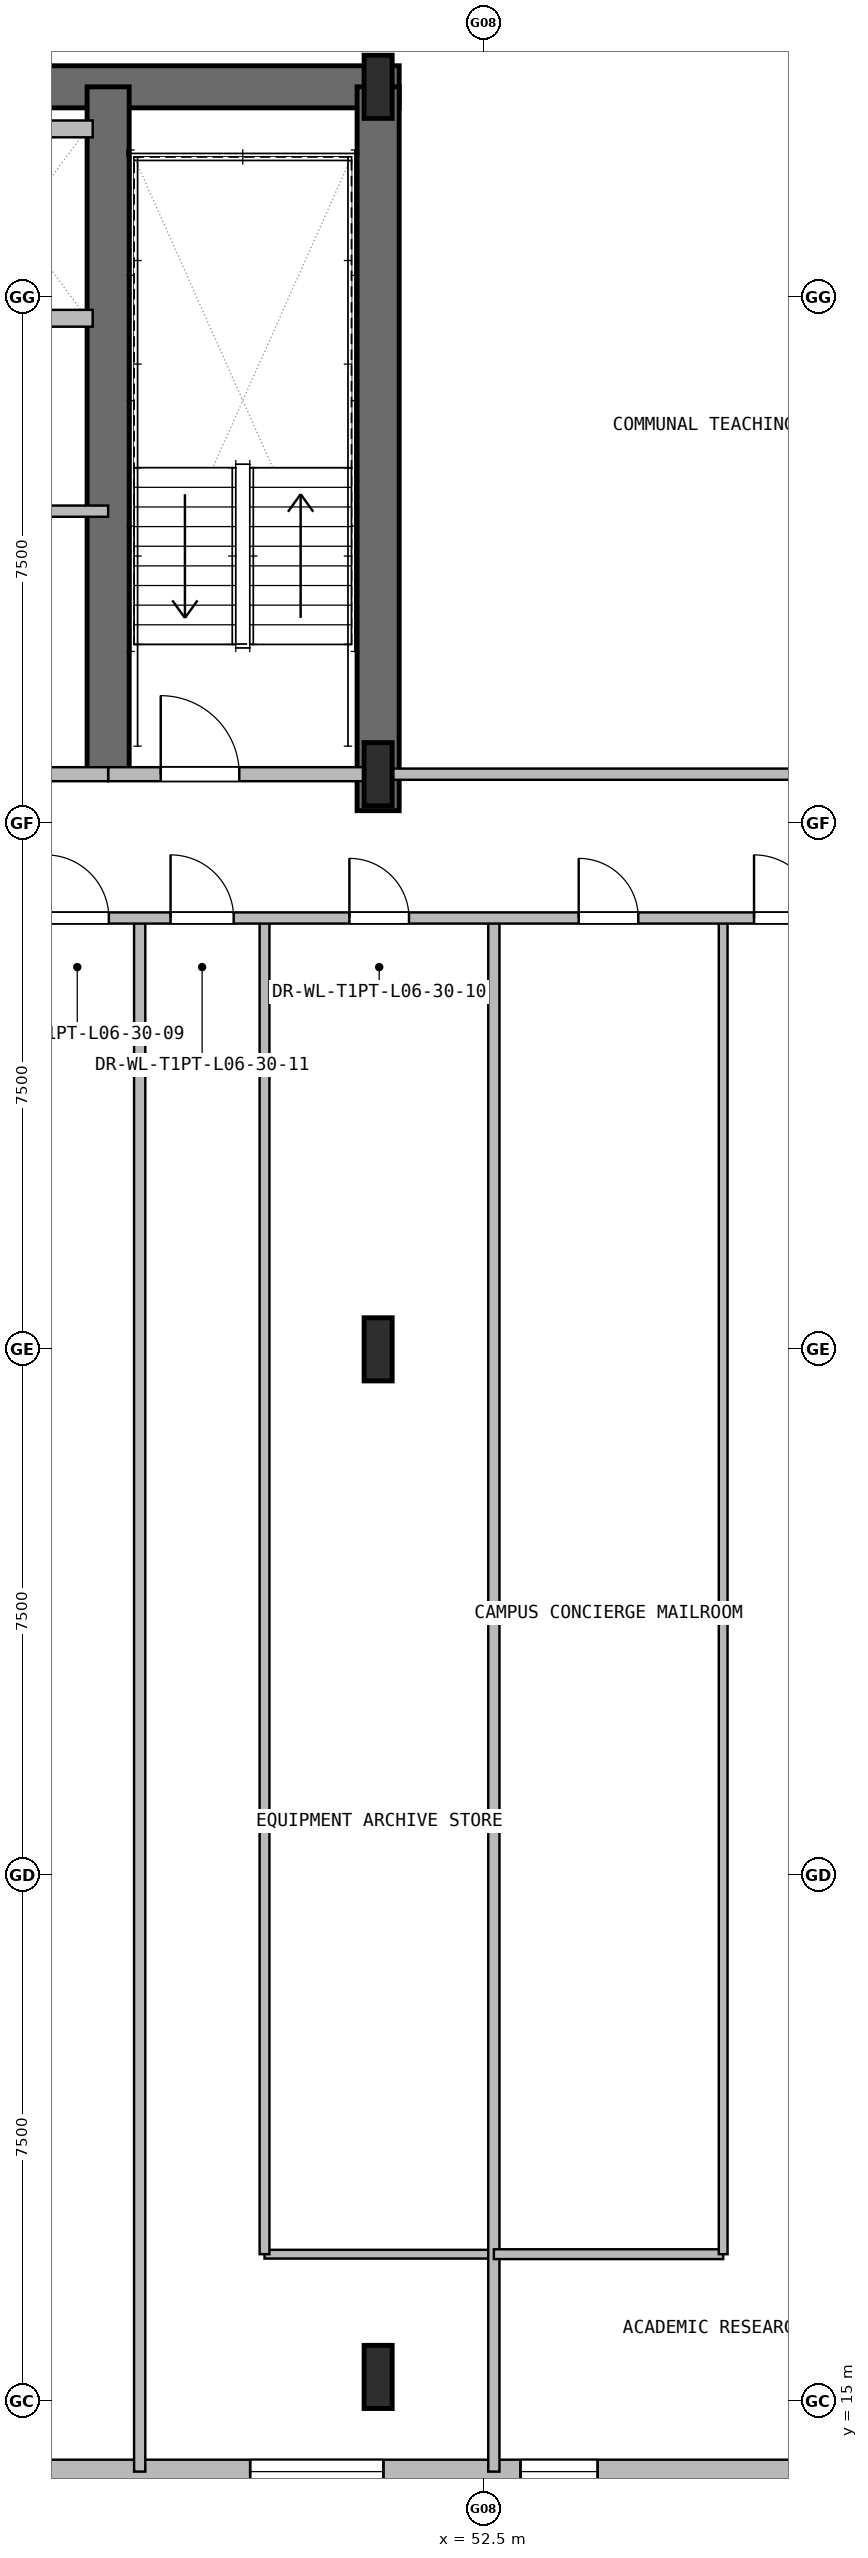
"""IFC4 building model, lengths in metres.
Left out: names, types, materials, properties, quantities, classifications, styles, units other than length and angle.
Written with IfcOpenShell. Run it as: python <this file> out.ifc"""

import sys

from ifc_helpers import new_model, si_unit, direction, frame, frame_2d, origin, origin_2d, place, context, subcontext, project, spatial, rectangle, i_section, extrude, element, fill, save


model = new_model("IFC4")
c1 = context("Model", 3, precision=1e-05, world=origin(), true_north=direction((0.0, 1.0)))
c2 = subcontext(c1, "Body", "Model", "MODEL_VIEW")
j1 = project(units=[si_unit("LENGTHUNIT", "METRE"), si_unit("PLANEANGLEUNIT", "RADIAN")], contexts=[c1])
p1 = place(None, origin())
s1 = spatial("IfcSite", under=j1, at=p1, CompositionType="ELEMENT")
p2 = place(p1, origin())
s2 = spatial("IfcBuilding", under=s1, at=p2, CompositionType="ELEMENT")
p3 = place(p2, frame((0.0, 0.0, 30.6)))
s3 = spatial("IfcBuildingStorey", under=s2, at=p3, CompositionType="ELEMENT", Elevation=30.6)
p4 = place(p3, frame((23.7, 48.0, 0.0), z_axis=(0.0, 0.0, 1.0), x_axis=(1.0, 0.0, 0.0)))
e1 = element("IfcWall", 1, at=p4, inside=s3, PredefinedType="SHEAR", context=c2, shape_type="SweptSolid", body=[
    extrude(rectangle(XDim=27.6, YDim=0.6, at=frame_2d((13.8, 0.0))), origin(), (0.0, 0.0, 1.0), 3.3),
])
p5 = place(p3, frame((51.0, 37.68, 0.0), z_axis=(0.0, 0.0, 1.0), x_axis=(0.0, 1.0, 0.0)))
e2 = element("IfcWall", 2, at=p5, inside=s3, PredefinedType="SHEAR", context=c2, shape_type="SweptSolid", body=[
    extrude(rectangle(XDim=10.32, YDim=0.6, at=frame_2d((5.16, 0.0))), origin(), (0.0, 0.0, 1.0), 3.3),
])
p6 = place(p3, frame((47.15, 38.2, 0.0), z_axis=(0.0, 0.0, 1.0), x_axis=(0.0, 1.0, 0.0)))
e3 = element("IfcWall", 3, at=p6, inside=s3, PredefinedType="SHEAR", context=c2, shape_type="SweptSolid", body=[
    extrude(rectangle(XDim=9.8, YDim=0.6, at=frame_2d((4.9, 0.0))), origin(), (0.0, 0.0, 1.0), 3.3),
])
for number, where, z_axis, x_axis in (
    (4, (51.0, 15.35, 0.0), (0.0, 0.0, 1.0), (1.0, 0.0, 0.0)),
    (5, (51.0, 30.0, 0.0), (0.0, 0.0, 1.0), (1.0, 0.0, 0.0)),
    (6, (51.0, 38.2, 0.0), (0.0, 0.0, 1.0), (1.0, 0.0, 0.0)),
    (7, (51.0, 48.0, 0.0), (0.0, 0.0, 1.0), (1.0, 0.0, 0.0)),
):
    element("IfcColumn", number, at=place(p3, frame(where, z_axis=z_axis, x_axis=x_axis)), inside=s3, PredefinedType="COLUMN", context=c2, shape_type="SweptSolid", body=[
        extrude(i_section(OverallWidth=0.4, OverallDepth=0.9, WebThickness=0.02, FlangeThickness=0.036, at=origin_2d()), origin(), (0.0, 0.0, 1.0), 3.3),
    ])
p7 = place(p3, frame((62.2, 14.0, 0.0), z_axis=(0.0, 0.0, 1.0), x_axis=(-1.0, 0.0, 0.0)))
e8 = element("IfcWall", 8, at=p7, inside=s3, PredefinedType="SOLIDWALL", context=c2, shape_type="SweptSolid", body=[
    extrude(rectangle(XDim=49.4, YDim=0.34, at=frame_2d((24.7, 0.0))), origin(), (0.0, 0.0, 1.0), 3.03),
])
p8 = place(p7, frame((35.197, 0.0, 0.0)))
e9 = element("IfcOpeningElement", 9, at=p8, cuts=e8, PredefinedType="OPENING", context=c2, shape_type="SweptSolid", body=[
    extrude(rectangle(XDim=1.05, YDim=2.1, at=frame_2d((0.525, 1.05))), frame((0.0, 0.18, 0.0), z_axis=(0.0, -1.0, 0.0), x_axis=(1.0, 0.0, 0.0)), (0.0, 0.0, 1.0), 0.36),
])
p9 = place(p7, frame((40.23, 0.0, 0.8)))
e10 = element("IfcOpeningElement", 10, at=p9, cuts=e8, PredefinedType="OPENING", context=c2, shape_type="SweptSolid", body=[
    extrude(rectangle(XDim=1.1, YDim=1.5, at=frame_2d((0.55, 0.75))), frame((0.0, 0.18, 0.0), z_axis=(0.0, -1.0, 0.0), x_axis=(1.0, 0.0, 0.0)), (0.0, 0.0, 1.0), 0.36),
])
p10 = place(p7, frame((36.614, 0.0, 0.8)))
e11 = element("IfcOpeningElement", 11, at=p10, cuts=e8, PredefinedType="OPENING", context=c2, shape_type="SweptSolid", body=[
    extrude(rectangle(XDim=1.9, YDim=1.85, at=frame_2d((0.95, 0.925))), frame((0.0, 0.18, 0.0), z_axis=(0.0, -1.0, 0.0), x_axis=(1.0, 0.0, 0.0)), (0.0, 0.0, 1.0), 0.36),
])
p11 = place(p7, frame((26.275, 0.0, 0.8)))
e12 = element("IfcOpeningElement", 12, at=p11, cuts=e8, PredefinedType="OPENING", context=c2, shape_type="SweptSolid", body=[
    extrude(rectangle(XDim=1.9, YDim=1.85, at=frame_2d((0.95, 0.925))), frame((0.0, 0.18, 0.0), z_axis=(0.0, -1.0, 0.0), x_axis=(1.0, 0.0, 0.0)), (0.0, 0.0, 1.0), 0.36),
])
p12 = place(p7, frame((16.175, 0.0, 0.8)))
e13 = element("IfcOpeningElement", 13, at=p12, cuts=e8, PredefinedType="OPENING", context=c2, shape_type="SweptSolid", body=[
    extrude(rectangle(XDim=1.9, YDim=1.85, at=frame_2d((0.95, 0.925))), frame((0.0, 0.18, 0.0), z_axis=(0.0, -1.0, 0.0), x_axis=(1.0, 0.0, 0.0)), (0.0, 0.0, 1.0), 0.36),
])
p13 = place(p7, frame((11.125, 0.0, 0.8)))
e14 = element("IfcOpeningElement", 14, at=p13, cuts=e8, PredefinedType="OPENING", context=c2, shape_type="SweptSolid", body=[
    extrude(rectangle(XDim=1.9, YDim=1.85, at=frame_2d((0.95, 0.925))), frame((0.0, 0.18, 0.0), z_axis=(0.0, -1.0, 0.0), x_axis=(1.0, 0.0, 0.0)), (0.0, 0.0, 1.0), 0.36),
])
p14 = place(p7, frame((8.07, 0.0, 0.8)))
e15 = element("IfcOpeningElement", 15, at=p14, cuts=e8, PredefinedType="OPENING", context=c2, shape_type="SweptSolid", body=[
    extrude(rectangle(XDim=1.1, YDim=1.5, at=frame_2d((0.55, 0.75))), frame((0.0, 0.18, 0.0), z_axis=(0.0, -1.0, 0.0), x_axis=(1.0, 0.0, 0.0)), (0.0, 0.0, 1.0), 0.36),
])
p15 = place(p3, frame((47.15, 38.2, 0.0), z_axis=(0.0, 0.0, 1.0), x_axis=(1.0, 0.0, 0.0)))
e16 = element("IfcWall", 16, at=p15, inside=s3, PredefinedType="PARTITIONING", context=c2, shape_type="SweptSolid", body=[
    extrude(rectangle(XDim=3.85, YDim=0.2, at=frame_2d((1.925, 0.0))), origin(), (0.0, 0.0, 1.0), 2.33),
])
p16 = place(p15, frame((0.75, 0.0, 0.0)))
e17 = element("IfcOpeningElement", 17, at=p16, cuts=e16, PredefinedType="OPENING", context=c2, shape_type="SweptSolid", body=[
    extrude(rectangle(XDim=1.12, YDim=2.1, at=frame_2d((0.56, 1.05))), frame((0.0, 0.11, 0.0), z_axis=(0.0, -1.0, 0.0), x_axis=(1.0, 0.0, 0.0)), (0.0, 0.0, 1.0), 0.22),
])
p17 = place(p3, frame((30.8, 38.2, 0.0), z_axis=(0.0, 0.0, 1.0), x_axis=(1.0, 0.0, 0.0)))
e18 = element("IfcWall", 18, at=p17, inside=s3, PredefinedType="PARTITIONING", context=c2, shape_type="SweptSolid", body=[
    extrude(rectangle(XDim=16.35, YDim=0.2, at=frame_2d((8.175, 0.0))), origin(), (0.0, 0.0, 1.0), 2.33),
])
p18 = place(p17, frame((2.95, 0.0, 0.0)))
e19 = element("IfcOpeningElement", 19, at=p18, cuts=e18, PredefinedType="OPENING", context=c2, shape_type="SweptSolid", body=[
    extrude(rectangle(XDim=1.12, YDim=2.1, at=frame_2d((0.56, 1.05))), frame((0.0, 0.11, 0.0), z_axis=(0.0, -1.0, 0.0), x_axis=(1.0, 0.0, 0.0)), (0.0, 0.0, 1.0), 0.22),
])
p19 = place(p17, frame((8.75, 0.0, 0.0)))
e20 = element("IfcOpeningElement", 20, at=p19, cuts=e18, PredefinedType="OPENING", context=c2, shape_type="SweptSolid", body=[
    extrude(rectangle(XDim=1.12, YDim=2.1, at=frame_2d((0.56, 1.05))), frame((0.0, 0.11, 0.0), z_axis=(0.0, -1.0, 0.0), x_axis=(1.0, 0.0, 0.0)), (0.0, 0.0, 1.0), 0.22),
])
for number, where, z_axis, x_axis in (
    (21, (44.77, 44.7, 0.0), (0.0, 0.0, 1.0), (1.0, 0.0, 0.0)),
    (22, (44.77, 47.4, 0.0), (0.0, 0.0, 1.0), (1.0, 0.0, 0.0)),
):
    element("IfcWall", number, at=place(p3, frame(where, z_axis=z_axis, x_axis=x_axis)), inside=s3, PredefinedType="PARTITIONING", context=c2, shape_type="SweptSolid", body=[
        extrude(rectangle(XDim=2.16, YDim=0.24, at=frame_2d((1.08, 0.0))), origin(), (0.0, 0.0, 1.0), 3.03),
    ])
p20 = place(p3, frame((42.5, 41.95, 0.0), z_axis=(0.0, 0.0, 1.0), x_axis=(1.0, 0.0, 0.0)))
e23 = element("IfcWall", 23, at=p20, inside=s3, PredefinedType="PARTITIONING", context=c2, shape_type="SweptSolid", body=[
    extrude(rectangle(XDim=4.65, YDim=0.16, at=frame_2d((2.325, 0.0))), origin(), (0.0, 0.0, 1.0), 3.03),
])
p21 = place(p20, frame((0.66, 0.0, 0.0)))
e24 = element("IfcOpeningElement", 24, at=p21, cuts=e23, PredefinedType="OPENING", context=c2, shape_type="SweptSolid", body=[
    extrude(rectangle(XDim=0.85, YDim=2.05, at=frame_2d((0.425, 1.025))), frame((0.0, 0.09, 0.0), z_axis=(0.0, -1.0, 0.0), x_axis=(1.0, 0.0, 0.0)), (0.0, 0.0, 1.0), 0.18),
])
p22 = place(p20, frame((2.73, 0.0, 0.0)))
e25 = element("IfcOpeningElement", 25, at=p22, cuts=e23, PredefinedType="OPENING", context=c2, shape_type="SweptSolid", body=[
    extrude(rectangle(XDim=0.85, YDim=2.05, at=frame_2d((0.425, 1.025))), frame((0.0, 0.09, 0.0), z_axis=(0.0, -1.0, 0.0), x_axis=(1.0, 0.0, 0.0)), (0.0, 0.0, 1.0), 0.18),
])
p23 = place(p3, frame((51.0, 38.2, 0.0), z_axis=(0.0, 0.0, 1.0), x_axis=(1.0, 0.0, 0.0)))
e26 = element("IfcWall", 26, at=p23, inside=s3, PredefinedType="PARTITIONING", context=c2, shape_type="SweptSolid", body=[
    extrude(rectangle(XDim=8.85, YDim=0.16, at=frame_2d((4.425, 0.0))), origin(), (0.0, 0.0, 1.0), 2.33),
])
p24 = place(p3, frame((47.6, 14.0, 0.0), z_axis=(0.0, 0.0, 1.0), x_axis=(0.0, 1.0, 0.0)))
e27 = element("IfcWall", 27, at=p24, inside=s3, PredefinedType="PARTITIONING", context=c2, shape_type="SweptSolid", body=[
    extrude(rectangle(XDim=22.15, YDim=0.16, at=frame_2d((11.075, 0.0))), origin(), (0.0, 0.0, 1.0), 3.03),
])
p25 = place(p3, frame((49.38, 17.1, 0.0), z_axis=(0.0, 0.0, 1.0), x_axis=(1.0, 0.0, 0.0)))
e28 = element("IfcWall", 28, at=p25, inside=s3, PredefinedType="PARTITIONING", context=c2, shape_type="SweptSolid", body=[
    extrude(rectangle(XDim=3.27, YDim=0.125, at=frame_2d((1.635, 0.0))), origin(), (0.0, 0.0, 1.0), 3.03),
])
p26 = place(p3, frame((49.38, 17.1, 0.0), z_axis=(0.0, 0.0, 1.0), x_axis=(0.0, 1.0, 0.0)))
e29 = element("IfcWall", 29, at=p26, inside=s3, PredefinedType="PARTITIONING", context=c2, shape_type="SweptSolid", body=[
    extrude(rectangle(XDim=19.05, YDim=0.14, at=frame_2d((9.525, 0.0))), origin(), (0.0, 0.0, 1.0), 3.03),
])
p27 = place(p3, frame((52.65, 14.0, 0.0), z_axis=(0.0, 0.0, 1.0), x_axis=(0.0, 1.0, 0.0)))
e30 = element("IfcWall", 30, at=p27, inside=s3, PredefinedType="PARTITIONING", context=c2, shape_type="SweptSolid", body=[
    extrude(rectangle(XDim=22.15, YDim=0.16, at=frame_2d((11.075, 0.0))), origin(), (0.0, 0.0, 1.0), 3.03),
])
p28 = place(p3, frame((52.65, 17.1, 0.0), z_axis=(0.0, 0.0, 1.0), x_axis=(1.0, 0.0, 0.0)))
e31 = element("IfcWall", 31, at=p28, inside=s3, PredefinedType="PARTITIONING", context=c2, shape_type="SweptSolid", body=[
    extrude(rectangle(XDim=3.27, YDim=0.14, at=frame_2d((1.635, 0.0))), origin(), (0.0, 0.0, 1.0), 3.03),
])
p29 = place(p3, frame((55.92, 17.1, 0.0), z_axis=(0.0, 0.0, 1.0), x_axis=(0.0, 1.0, 0.0)))
e32 = element("IfcWall", 32, at=p29, inside=s3, PredefinedType="PARTITIONING", context=c2, shape_type="SweptSolid", body=[
    extrude(rectangle(XDim=19.05, YDim=0.125, at=frame_2d((9.525, 0.0))), origin(), (0.0, 0.0, 1.0), 3.03),
])
p30 = place(p3, frame((17.3, 36.15, 0.0), z_axis=(0.0, 0.0, 1.0), x_axis=(1.0, 0.0, 0.0)))
e33 = element("IfcWall", 33, at=p30, inside=s3, PredefinedType="PARTITIONING", context=c2, shape_type="SweptSolid", body=[
    extrude(rectangle(XDim=40.4, YDim=0.16, at=frame_2d((20.2, 0.0))), origin(), (0.0, 0.0, 1.0), 3.03),
])
p31 = place(p30, frame((2.99, 0.0, 0.0)))
e34 = element("IfcOpeningElement", 34, at=p31, cuts=e33, PredefinedType="OPENING", context=c2, shape_type="SweptSolid", body=[
    extrude(rectangle(XDim=0.85, YDim=2.05, at=frame_2d((0.425, 1.025))), frame((0.0, 0.09, 0.0), z_axis=(0.0, -1.0, 0.0), x_axis=(1.0, 0.0, 0.0)), (0.0, 0.0, 1.0), 0.18),
])
p32 = place(p30, frame((0.44, 0.0, 0.0)))
e35 = element("IfcOpeningElement", 35, at=p32, cuts=e33, PredefinedType="OPENING", context=c2, shape_type="SweptSolid", body=[
    extrude(rectangle(XDim=0.9, YDim=2.05, at=frame_2d((0.45, 1.025))), frame((0.0, 0.09, 0.0), z_axis=(0.0, -1.0, 0.0), x_axis=(1.0, 0.0, 0.0)), (0.0, 0.0, 1.0), 0.18),
])
p33 = place(p30, frame((6.26, 0.0, 0.0)))
e36 = element("IfcOpeningElement", 36, at=p33, cuts=e33, PredefinedType="OPENING", context=c2, shape_type="SweptSolid", body=[
    extrude(rectangle(XDim=0.85, YDim=2.05, at=frame_2d((0.425, 1.025))), frame((0.0, 0.09, 0.0), z_axis=(0.0, -1.0, 0.0), x_axis=(1.0, 0.0, 0.0)), (0.0, 0.0, 1.0), 0.18),
])
p34 = place(p30, frame((8.76, 0.0, 0.0)))
e37 = element("IfcOpeningElement", 37, at=p34, cuts=e33, PredefinedType="OPENING", context=c2, shape_type="SweptSolid", body=[
    extrude(rectangle(XDim=0.9, YDim=2.05, at=frame_2d((0.45, 1.025))), frame((0.0, 0.09, 0.0), z_axis=(0.0, -1.0, 0.0), x_axis=(1.0, 0.0, 0.0)), (0.0, 0.0, 1.0), 0.18),
])
p35 = place(p30, frame((12.15, 0.0, 0.0)))
e38 = element("IfcOpeningElement", 38, at=p35, cuts=e33, PredefinedType="OPENING", context=c2, shape_type="SweptSolid", body=[
    extrude(rectangle(XDim=0.95, YDim=2.1, at=frame_2d((0.475, 1.05))), frame((0.0, 0.09, 0.0), z_axis=(0.0, -1.0, 0.0), x_axis=(1.0, 0.0, 0.0)), (0.0, 0.0, 1.0), 0.18),
])
p36 = place(p30, frame((17.225, 0.0, 0.0)))
e39 = element("IfcOpeningElement", 39, at=p36, cuts=e33, PredefinedType="OPENING", context=c2, shape_type="SweptSolid", body=[
    extrude(rectangle(XDim=0.9, YDim=2.05, at=frame_2d((0.45, 1.025))), frame((0.0, 0.09, 0.0), z_axis=(0.0, -1.0, 0.0), x_axis=(1.0, 0.0, 0.0)), (0.0, 0.0, 1.0), 0.18),
])
p37 = place(p30, frame((22.275, 0.0, 0.0)))
e40 = element("IfcOpeningElement", 40, at=p37, cuts=e33, PredefinedType="OPENING", context=c2, shape_type="SweptSolid", body=[
    extrude(rectangle(XDim=0.9, YDim=2.05, at=frame_2d((0.45, 1.025))), frame((0.0, 0.09, 0.0), z_axis=(0.0, -1.0, 0.0), x_axis=(1.0, 0.0, 0.0)), (0.0, 0.0, 1.0), 0.18),
])
p38 = place(p30, frame((26.46, 0.0, 0.0)))
e41 = element("IfcOpeningElement", 41, at=p38, cuts=e33, PredefinedType="OPENING", context=c2, shape_type="SweptSolid", body=[
    extrude(rectangle(XDim=0.85, YDim=2.05, at=frame_2d((0.425, 1.025))), frame((0.0, 0.09, 0.0), z_axis=(0.0, -1.0, 0.0), x_axis=(1.0, 0.0, 0.0)), (0.0, 0.0, 1.0), 0.18),
])
p39 = place(p30, frame((28.96, 0.0, 0.0)))
e42 = element("IfcOpeningElement", 42, at=p39, cuts=e33, PredefinedType="OPENING", context=c2, shape_type="SweptSolid", body=[
    extrude(rectangle(XDim=0.9, YDim=2.05, at=frame_2d((0.45, 1.025))), frame((0.0, 0.09, 0.0), z_axis=(0.0, -1.0, 0.0), x_axis=(1.0, 0.0, 0.0)), (0.0, 0.0, 1.0), 0.18),
])
p40 = place(p30, frame((33.29, 0.0, 0.0)))
e43 = element("IfcOpeningElement", 43, at=p40, cuts=e33, PredefinedType="OPENING", context=c2, shape_type="SweptSolid", body=[
    extrude(rectangle(XDim=0.85, YDim=2.05, at=frame_2d((0.425, 1.025))), frame((0.0, 0.09, 0.0), z_axis=(0.0, -1.0, 0.0), x_axis=(1.0, 0.0, 0.0)), (0.0, 0.0, 1.0), 0.18),
])
p41 = place(p30, frame((30.74, 0.0, 0.0)))
e44 = element("IfcOpeningElement", 44, at=p41, cuts=e33, PredefinedType="OPENING", context=c2, shape_type="SweptSolid", body=[
    extrude(rectangle(XDim=0.9, YDim=2.05, at=frame_2d((0.45, 1.025))), frame((0.0, 0.09, 0.0), z_axis=(0.0, -1.0, 0.0), x_axis=(1.0, 0.0, 0.0)), (0.0, 0.0, 1.0), 0.18),
])
p42 = place(p30, frame((36.56, 0.0, 0.0)))
e45 = element("IfcOpeningElement", 45, at=p42, cuts=e33, PredefinedType="OPENING", context=c2, shape_type="SweptSolid", body=[
    extrude(rectangle(XDim=0.85, YDim=2.05, at=frame_2d((0.425, 1.025))), frame((0.0, 0.09, 0.0), z_axis=(0.0, -1.0, 0.0), x_axis=(1.0, 0.0, 0.0)), (0.0, 0.0, 1.0), 0.18),
])
p43 = place(p30, frame((39.06, 0.0, 0.0)))
e46 = element("IfcOpeningElement", 46, at=p43, cuts=e33, PredefinedType="OPENING", context=c2, shape_type="SweptSolid", body=[
    extrude(rectangle(XDim=0.9, YDim=2.05, at=frame_2d((0.45, 1.025))), frame((0.0, 0.09, 0.0), z_axis=(0.0, -1.0, 0.0), x_axis=(1.0, 0.0, 0.0)), (0.0, 0.0, 1.0), 0.18),
])
p44 = place(p13, origin())
e47 = element("IfcWindow", 47, at=p44, inside=s3, PartitioningType="SINGLE_PANEL", PredefinedType="WINDOW", context=c2, shape_type="SweptSolid", body=[
    extrude(rectangle(XDim=1.9, YDim=1.85, at=frame_2d((0.95, 0.925))), frame((0.0, 0.03, 0.0), z_axis=(0.0, -1.0, 0.0), x_axis=(1.0, 0.0, 0.0)), (0.0, 0.0, 1.0), 0.06),
])
fill(e14, e47)
p45 = place(p14, origin())
e48 = element("IfcWindow", 48, at=p45, inside=s3, PartitioningType="SINGLE_PANEL", PredefinedType="WINDOW", context=c2, shape_type="SweptSolid", body=[
    extrude(rectangle(XDim=1.1, YDim=1.5, at=frame_2d((0.55, 0.75))), frame((0.0, 0.03, 0.0), z_axis=(0.0, -1.0, 0.0), x_axis=(1.0, 0.0, 0.0)), (0.0, 0.0, 1.0), 0.06),
])
fill(e15, e48)
p46 = place(p16, origin())
e49 = element("IfcDoor", 49, at=p46, inside=s3, OperationType="SINGLE_SWING_RIGHT", PredefinedType="DOOR", context=c2, shape_type="SweptSolid", body=[
    extrude(rectangle(XDim=1.12, YDim=2.1, at=frame_2d((0.56, 1.05))), frame((0.0, 0.025, 0.0), z_axis=(0.0, -1.0, 0.0), x_axis=(1.0, 0.0, 0.0)), (0.0, 0.0, 1.0), 0.05),
])
fill(e17, e49)
p47 = place(p39, origin())
e50 = element("IfcDoor", 50, at=p47, inside=s3, OperationType="SINGLE_SWING_RIGHT", PredefinedType="DOOR", context=c2, shape_type="SweptSolid", body=[
    extrude(rectangle(XDim=0.9, YDim=2.05, at=frame_2d((0.45, 1.025))), frame((0.0, 0.025, 0.0), z_axis=(0.0, -1.0, 0.0), x_axis=(1.0, 0.0, 0.0)), (0.0, 0.0, 1.0), 0.05),
])
fill(e42, e50)
p48 = place(p40, origin())
e51 = element("IfcDoor", 51, at=p48, inside=s3, OperationType="SINGLE_SWING_LEFT", PredefinedType="DOOR", context=c2, shape_type="SweptSolid", body=[
    extrude(rectangle(XDim=0.85, YDim=2.05, at=frame_2d((0.425, 1.025))), frame((0.0, 0.025, 0.0), z_axis=(0.0, -1.0, 0.0), x_axis=(1.0, 0.0, 0.0)), (0.0, 0.0, 1.0), 0.05),
])
fill(e43, e51)
p49 = place(p41, origin())
e52 = element("IfcDoor", 52, at=p49, inside=s3, OperationType="SINGLE_SWING_RIGHT", PredefinedType="DOOR", context=c2, shape_type="SweptSolid", body=[
    extrude(rectangle(XDim=0.9, YDim=2.05, at=frame_2d((0.45, 1.025))), frame((0.0, 0.025, 0.0), z_axis=(0.0, -1.0, 0.0), x_axis=(1.0, 0.0, 0.0)), (0.0, 0.0, 1.0), 0.05),
])
fill(e44, e52)
p50 = place(p42, origin())
e53 = element("IfcDoor", 53, at=p50, inside=s3, OperationType="SINGLE_SWING_LEFT", PredefinedType="DOOR", context=c2, shape_type="SweptSolid", body=[
    extrude(rectangle(XDim=0.85, YDim=2.05, at=frame_2d((0.425, 1.025))), frame((0.0, 0.025, 0.0), z_axis=(0.0, -1.0, 0.0), x_axis=(1.0, 0.0, 0.0)), (0.0, 0.0, 1.0), 0.05),
])
fill(e45, e53)
p51 = place(p43, origin())
e54 = element("IfcDoor", 54, at=p51, inside=s3, OperationType="SINGLE_SWING_RIGHT", PredefinedType="DOOR", context=c2, shape_type="SweptSolid", body=[
    extrude(rectangle(XDim=0.9, YDim=2.05, at=frame_2d((0.45, 1.025))), frame((0.0, 0.025, 0.0), z_axis=(0.0, -1.0, 0.0), x_axis=(1.0, 0.0, 0.0)), (0.0, 0.0, 1.0), 0.05),
])
fill(e46, e54)
save(model, sys.argv[1])
